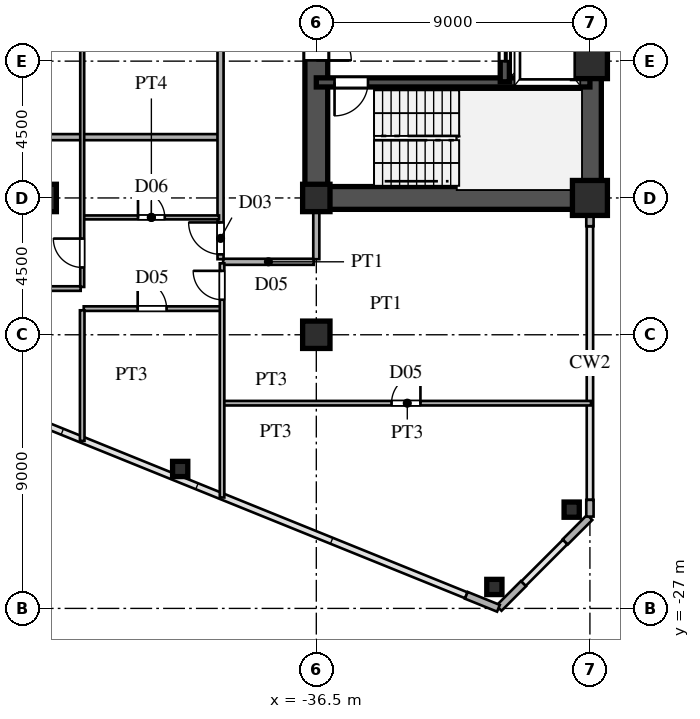
"""IFC4 building model, lengths in metres.
Left out: names, types, materials, properties, quantities, classifications, styles, units other than length and angle.
Written with IfcOpenShell. Run it as: python <this file> out.ifc"""

import sys

from ifc_helpers import new_model, si_unit, direction, frame, frame_2d, origin, origin_2d, place, context, subcontext, project, spatial, rectangle, hollow_rectangle, i_section, extrude, source, transform, mapped, element, fill, save


model = new_model("IFC4")
c1 = context("Model", 3, precision=1e-05, world=origin(), true_north=direction((0.0, 1.0)))
c2 = subcontext(c1, "Body", "Model", "MODEL_VIEW")
j1 = project(units=[si_unit("LENGTHUNIT", "METRE"), si_unit("PLANEANGLEUNIT", "RADIAN")], contexts=[c1])
p1 = place(None, origin())
s1 = spatial("IfcSite", under=j1, at=p1, CompositionType="ELEMENT")
p2 = place(p1, origin())
s2 = spatial("IfcBuilding", under=s1, at=p2, CompositionType="ELEMENT")
p3 = place(p2, frame((0.0, 0.0, 33.3)))
s3 = spatial("IfcBuildingStorey", under=s2, at=p3, CompositionType="ELEMENT", Elevation=33.3)
m1 = source(origin(), c2, "Body", "SweptSolid", [
    extrude(hollow_rectangle(XDim=1.15, YDim=1.15, WallThickness=0.048, at=origin_2d()), origin(), (0.0, 0.0, 1.0), 3.6),
])
for number, where, z_axis, x_axis in (
    (1, (-27.5, -13.5, 0.0), (0.0, 0.0, 1.0), (1.0, 0.0, 0.0)),
    (2, (-27.5, -9.0, 0.0), (0.0, 0.0, 1.0), (1.0, 0.0, 0.0)),
):
    element("IfcColumn", number, at=place(p3, frame(where, z_axis=z_axis, x_axis=x_axis)), inside=s3, PredefinedType="COLUMN", context=c2, shape_type="MappedRepresentation", body=[
        mapped(m1, transform((0.0, 0.0, 0.0), scale=1.0)),
    ])
m2 = source(origin(), c2, "Body", "SweptSolid", [
    extrude(i_section(OverallWidth=0.9, OverallDepth=0.9, WebThickness=0.036, FlangeThickness=0.055, at=origin_2d()), origin(), (0.0, 0.0, 1.0), 3.6),
])
for number, where, z_axis, x_axis in (
    (3, (-36.5, -18.0, 0.0), (0.0, 0.0, 1.0), (1.0, 0.0, 0.0)),
    (4, (-36.5, -13.5, 0.0), (0.0, 0.0, 1.0), (1.0, 0.0, 0.0)),
    (5, (-45.5, -13.5, 0.0), (0.0, 0.0, 1.0), (1.0, 0.0, 0.0)),
):
    element("IfcColumn", number, at=place(p3, frame(where, z_axis=z_axis, x_axis=x_axis)), inside=s3, PredefinedType="COLUMN", context=c2, shape_type="MappedRepresentation", body=[
        mapped(m2, transform((0.0, 0.0, 0.0), scale=1.0)),
    ])
m3 = source(origin(), c2, "Body", "SweptSolid", [
    extrude(hollow_rectangle(XDim=0.5, YDim=0.5, WallThickness=0.02, at=origin_2d()), origin(), (0.0, 0.0, 1.0), 3.6),
])
for number, where, z_axis, x_axis in (
    (6, (-28.1, -23.751, 0.0), (0.0, 0.0, 1.0), (1.0, 0.0, 0.0)),
    (7, (-30.643, -26.295, 0.0), (0.0, 0.0, 1.0), (1.0, 0.0, 0.0)),
    (8, (-40.977, -22.414, 0.0), (0.0, 0.0, 1.0), (1.0, 0.0, 0.0)),
):
    element("IfcColumn", number, at=place(p3, frame(where, z_axis=z_axis, x_axis=x_axis)), inside=s3, PredefinedType="COLUMN", context=c2, shape_type="MappedRepresentation", body=[
        mapped(m3, transform((0.0, 0.0, 0.0), scale=1.0)),
    ])
p4 = place(p3, frame((-27.5, -23.98, 0.0), z_axis=(0.0, 0.0, 1.0), x_axis=(0.0, 1.0, 0.0)))
e9 = element("IfcWall", 9, at=p4, inside=s3, PredefinedType="SOLIDWALL", context=c2, shape_type="SweptSolid", body=[
    extrude(rectangle(XDim=0.55, YDim=0.24, at=frame_2d((0.275, 0.0))), origin(), (0.0, 0.0, 1.0), 3.38),
])
p5 = place(p3, frame((-27.5, -14.43, 0.0), z_axis=(0.0, 0.0, 1.0), x_axis=(0.0, 1.0, 0.0)))
e10 = element("IfcWall", 10, at=p5, inside=s3, PredefinedType="SOLIDWALL", context=c2, shape_type="SweptSolid", body=[
    extrude(rectangle(XDim=0.55, YDim=0.24, at=frame_2d((0.275, 0.0))), origin(), (0.0, 0.0, 1.0), 2.88),
])
p6 = place(p3, frame((-31.566, -26.569, 0.0), z_axis=(0.0, 0.0, 1.0), x_axis=(0.927007103665, -0.375043770452, 0.0)))
e11 = element("IfcWall", 11, at=p6, inside=s3, PredefinedType="SOLIDWALL", context=c2, shape_type="SweptSolid", body=[
    extrude(rectangle(XDim=1.14, YDim=0.24, at=frame_2d((0.57, 0.0))), origin(), (0.0, 0.0, 1.0), 3.38),
])
for number, where, z_axis, x_axis in (
    (12, (-30.493, -26.993, 0.0), (0.0, 0.0, 1.0), (0.707, 0.707, 0.0)),
    (13, (-28.313, -24.813, 0.0), (0.0, 0.0, 1.0), (0.707, 0.707, 0.0)),
):
    element("IfcWall", number, at=place(p3, frame(where, z_axis=z_axis, x_axis=x_axis)), inside=s3, PredefinedType="SOLIDWALL", context=c2, shape_type="SweptSolid", body=[
        extrude(rectangle(XDim=1.14, YDim=0.24, at=frame_2d((0.57, 0.0))), origin(), (0.0, 0.0, 1.0), 3.38),
    ])
p7 = place(p3, frame((-27.5, -13.5, 0.0), z_axis=(0.0, 0.0, 1.0), x_axis=(0.0, 1.0, 0.0)))
e14 = element("IfcWall", 14, at=p7, inside=s3, PredefinedType="SHEAR", context=c2, shape_type="SweptSolid", body=[
    extrude(rectangle(XDim=12.2, YDim=0.75, at=frame_2d((6.1, 0.0))), origin(), (0.0, 0.0, 1.0), 3.38),
])
p8 = place(p3, frame((-36.5, -13.5, 0.0), z_axis=(0.0, 0.0, 1.0), x_axis=(1.0, 0.0, 0.0)))
e15 = element("IfcWall", 15, at=p8, inside=s3, PredefinedType="SHEAR", context=c2, shape_type="SweptSolid", body=[
    extrude(rectangle(XDim=9.0, YDim=0.75, at=frame_2d((4.5, 0.0))), origin(), (0.0, 0.0, 1.0), 3.38),
])
p9 = place(p3, frame((-36.5, -13.65, 0.0), z_axis=(0.0, 0.0, 1.0), x_axis=(0.0, 1.0, 0.0)))
e16 = element("IfcWall", 16, at=p9, inside=s3, PredefinedType="SHEAR", context=c2, shape_type="SweptSolid", body=[
    extrude(rectangle(XDim=7.15, YDim=0.75, at=frame_2d((3.575, 0.0))), origin(), (0.0, 0.0, 1.0), 3.38),
])
p10 = place(p9, frame((4.675, 0.0, 0.0)))
e17 = element("IfcOpeningElement", 17, at=p10, cuts=e16, PredefinedType="OPENING", context=c2, shape_type="SweptSolid", body=[
    extrude(rectangle(XDim=1.15, YDim=2.2, at=frame_2d((0.575, 1.1))), frame((0.0, 0.385, 0.0), z_axis=(0.0, -1.0, 0.0), x_axis=(1.0, 0.0, 0.0)), (0.0, 0.0, 1.0), 0.77),
])
p11 = place(p3, frame((-36.5, -9.7, 0.0), z_axis=(0.0, 0.0, 1.0), x_axis=(1.0, 0.0, 0.0)))
e18 = element("IfcWall", 18, at=p11, inside=s3, PredefinedType="SHEAR", context=c2, shape_type="SweptSolid", body=[
    extrude(rectangle(XDim=9.0, YDim=0.3, at=frame_2d((4.5, 0.0))), origin(), (0.0, 0.0, 1.0), 3.38),
])
p12 = place(p11, frame((0.6, 0.0, 0.0)))
e19 = element("IfcOpeningElement", 19, at=p12, cuts=e18, PredefinedType="OPENING", context=c2, shape_type="SweptSolid", body=[
    extrude(rectangle(XDim=1.1, YDim=2.2, at=frame_2d((0.55, 1.1))), frame((0.0, 0.16, 0.0), z_axis=(0.0, -1.0, 0.0), x_axis=(1.0, 0.0, 0.0)), (0.0, 0.0, 1.0), 0.32),
])
p13 = place(p3, frame((-30.3, -9.68, 0.0), z_axis=(0.0, 0.0, 1.0), x_axis=(0.0, 1.0, 0.0)))
e20 = element("IfcWall", 20, at=p13, inside=s3, PredefinedType="SHEAR", context=c2, shape_type="SweptSolid", body=[
    extrude(rectangle(XDim=2.56, YDim=0.3, at=frame_2d((1.28, 0.0))), origin(), (0.0, 0.0, 1.0), 3.38),
])
p14 = place(p13, frame((0.68, 0.0, 0.0)))
e21 = element("IfcOpeningElement", 21, at=p14, cuts=e20, PredefinedType="OPENING", context=c2, shape_type="SweptSolid", body=[
    extrude(rectangle(XDim=1.2, YDim=2.25, at=frame_2d((0.6, 1.125))), frame((0.0, 0.16, 0.0), z_axis=(0.0, -1.0, 0.0), x_axis=(1.0, 0.0, 0.0)), (0.0, 0.0, 1.0), 0.32),
])
p15 = place(p3, frame((-39.55, -20.25, 0.0), z_axis=(0.0, 0.0, 1.0), x_axis=(1.0, 0.0, 0.0)))
e22 = element("IfcWall", 22, at=p15, inside=s3, PredefinedType="PARTITIONING", context=c2, shape_type="SweptSolid", body=[
    extrude(rectangle(XDim=12.085, YDim=0.15, at=frame_2d((6.042, 0.0))), origin(), (0.0, 0.0, 1.0), 3.38),
])
p16 = place(p15, frame((5.525, 0.0, 0.0)))
e23 = element("IfcOpeningElement", 23, at=p16, cuts=e22, PredefinedType="OPENING", context=c2, shape_type="SweptSolid", body=[
    extrude(rectangle(XDim=0.95, YDim=2.15, at=frame_2d((0.475, 1.075))), frame((0.0, 0.085, 0.0), z_axis=(0.0, -1.0, 0.0), x_axis=(1.0, 0.0, 0.0)), (0.0, 0.0, 1.0), 0.17),
])
p17 = place(p3, frame((-44.15, -17.14, 0.0), z_axis=(0.0, 0.0, 1.0), x_axis=(1.0, 0.0, 0.0)))
e24 = element("IfcWall", 24, at=p17, inside=s3, PredefinedType="PARTITIONING", context=c2, shape_type="SweptSolid", body=[
    extrude(rectangle(XDim=4.5, YDim=0.15, at=frame_2d((2.25, 0.0))), origin(), (0.0, 0.0, 1.0), 3.38),
])
p18 = place(p17, frame((1.775, 0.0, 0.0)))
e25 = element("IfcOpeningElement", 25, at=p18, cuts=e24, PredefinedType="OPENING", context=c2, shape_type="SweptSolid", body=[
    extrude(rectangle(XDim=0.95, YDim=2.15, at=frame_2d((0.475, 1.075))), frame((0.0, 0.085, 0.0), z_axis=(0.0, -1.0, 0.0), x_axis=(1.0, 0.0, 0.0)), (0.0, 0.0, 1.0), 0.17),
])
p19 = place(p3, frame((-54.45, -16.48, 0.0), z_axis=(0.0, 0.0, 1.0), x_axis=(1.0, 0.0, 0.0)))
e26 = element("IfcWall", 26, at=p19, inside=s3, PredefinedType="PARTITIONING", context=c2, shape_type="SweptSolid", body=[
    extrude(rectangle(XDim=10.2, YDim=0.15, at=frame_2d((5.1, 0.0))), origin(), (0.0, 0.0, 1.0), 3.38),
])
p20 = place(p19, frame((4.625, 0.0, 0.0)))
e27 = element("IfcOpeningElement", 27, at=p20, cuts=e26, PredefinedType="OPENING", context=c2, shape_type="SweptSolid", body=[
    extrude(rectangle(XDim=0.95, YDim=2.15, at=frame_2d((0.475, 1.075))), frame((0.0, 0.085, 0.0), z_axis=(0.0, -1.0, 0.0), x_axis=(1.0, 0.0, 0.0)), (0.0, 0.0, 1.0), 0.17),
])
p21 = place(p3, frame((-39.565, -15.6, 0.0), z_axis=(0.0, 0.0, 1.0), x_axis=(1.0, 0.0, 0.0)))
e28 = element("IfcWall", 28, at=p21, inside=s3, PredefinedType="PARTITIONING", context=c2, shape_type="SweptSolid", body=[
    extrude(rectangle(XDim=2.98, YDim=0.2, at=frame_2d((1.49, 0.0))), origin(), (0.0, 0.0, 1.0), 3.38),
])
p22 = place(p3, frame((-44.15, -14.14, 0.0), z_axis=(0.0, 0.0, 1.0), x_axis=(1.0, 0.0, 0.0)))
e29 = element("IfcWall", 29, at=p22, inside=s3, PredefinedType="PARTITIONING", context=c2, shape_type="SweptSolid", body=[
    extrude(rectangle(XDim=4.45, YDim=0.13, at=frame_2d((2.225, 0.0))), origin(), (0.0, 0.0, 1.0), 3.38),
])
p23 = place(p22, frame((1.785, 0.0, 0.0)))
e30 = element("IfcOpeningElement", 30, at=p23, cuts=e29, PredefinedType="OPENING", context=c2, shape_type="SweptSolid", body=[
    extrude(rectangle(XDim=0.88, YDim=2.1, at=frame_2d((0.44, 1.05))), frame((0.0, 0.075, 0.0), z_axis=(0.0, -1.0, 0.0), x_axis=(1.0, 0.0, 0.0)), (0.0, 0.0, 1.0), 0.15),
])
p24 = place(p3, frame((-68.807, -11.5, 0.0), z_axis=(0.0, 0.0, 1.0), x_axis=(1.0, 0.0, 0.0)))
e31 = element("IfcWall", 31, at=p24, inside=s3, PredefinedType="PARTITIONING", context=c2, shape_type="SweptSolid", body=[
    extrude(rectangle(XDim=29.077, YDim=0.2, at=frame_2d((14.539, 0.0))), origin(), (0.0, 0.0, 1.0), 3.38),
])
p25 = place(p3, frame((-44.2, -21.49, 0.0), z_axis=(0.0, 0.0, 1.0), x_axis=(0.0, 1.0, 0.0)))
e32 = element("IfcWall", 32, at=p25, inside=s3, PredefinedType="PARTITIONING", context=c2, shape_type="SweptSolid", body=[
    extrude(rectangle(XDim=4.295, YDim=0.15, at=frame_2d((2.147, 0.0))), origin(), (0.0, 0.0, 1.0), 3.38),
])
p26 = place(p3, frame((-44.2, -16.427, 0.0), z_axis=(0.0, 0.0, 1.0), x_axis=(0.0, 1.0, 0.0)))
e33 = element("IfcWall", 33, at=p26, inside=s3, PredefinedType="PARTITIONING", context=c2, shape_type="SweptSolid", body=[
    extrude(rectangle(XDim=13.877, YDim=0.13, at=frame_2d((6.938, 0.0))), origin(), (0.0, 0.0, 1.0), 3.38),
])
p27 = place(p26, frame((0.641, 0.0, 0.0)))
e34 = element("IfcOpeningElement", 34, at=p27, cuts=e33, PredefinedType="OPENING", context=c2, shape_type="SweptSolid", body=[
    extrude(rectangle(XDim=0.95, YDim=2.15, at=frame_2d((0.475, 1.075))), frame((0.0, 0.075, 0.0), z_axis=(0.0, -1.0, 0.0), x_axis=(1.0, 0.0, 0.0)), (0.0, 0.0, 1.0), 0.15),
])
p28 = place(p26, frame((10.454, 0.0, 0.0)))
e35 = element("IfcOpeningElement", 35, at=p28, cuts=e33, PredefinedType="OPENING", context=c2, shape_type="SweptSolid", body=[
    extrude(rectangle(XDim=0.95, YDim=2.15, at=frame_2d((0.475, 1.075))), frame((0.0, 0.075, 0.0), z_axis=(0.0, -1.0, 0.0), x_axis=(1.0, 0.0, 0.0)), (0.0, 0.0, 1.0), 0.15),
])
p29 = place(p3, frame((-39.65, -15.515, 0.0), z_axis=(0.0, 0.0, 1.0), x_axis=(0.0, 1.0, 0.0)))
e36 = element("IfcWall", 36, at=p29, inside=s3, PredefinedType="PARTITIONING", context=c2, shape_type="SweptSolid", body=[
    extrude(rectangle(XDim=31.03, YDim=0.2, at=frame_2d((15.515, 0.0))), origin(), (0.0, 0.0, 1.0), 3.38),
])
p30 = place(p29, frame((0.16, 0.0, 0.0)))
e37 = element("IfcOpeningElement", 37, at=p30, cuts=e36, PredefinedType="OPENING", context=c2, shape_type="SweptSolid", body=[
    extrude(rectangle(XDim=1.05, YDim=2.25, at=frame_2d((0.525, 1.125))), frame((0.0, 0.11, 0.0), z_axis=(0.0, -1.0, 0.0), x_axis=(1.0, 0.0, 0.0)), (0.0, 0.0, 1.0), 0.22),
])
p31 = place(p29, frame((10.038, 0.0, 0.0)))
e38 = element("IfcOpeningElement", 38, at=p31, cuts=e36, PredefinedType="OPENING", context=c2, shape_type="SweptSolid", body=[
    extrude(rectangle(XDim=1.05, YDim=2.25, at=frame_2d((0.525, 1.125))), frame((0.0, 0.11, 0.0), z_axis=(0.0, -1.0, 0.0), x_axis=(1.0, 0.0, 0.0)), (0.0, 0.0, 1.0), 0.22),
])
p32 = place(p29, frame((21.638, 0.0, 0.0)))
e39 = element("IfcOpeningElement", 39, at=p32, cuts=e36, PredefinedType="OPENING", context=c2, shape_type="SweptSolid", body=[
    extrude(rectangle(XDim=1.05, YDim=2.25, at=frame_2d((0.525, 1.125))), frame((0.0, 0.11, 0.0), z_axis=(0.0, -1.0, 0.0), x_axis=(1.0, 0.0, 0.0)), (0.0, 0.0, 1.0), 0.22),
])
p33 = place(p29, frame((29.82, 0.0, 0.0)))
e40 = element("IfcOpeningElement", 40, at=p33, cuts=e36, PredefinedType="OPENING", context=c2, shape_type="SweptSolid", body=[
    extrude(rectangle(XDim=1.05, YDim=2.25, at=frame_2d((0.525, 1.125))), frame((0.0, 0.11, 0.0), z_axis=(0.0, -1.0, 0.0), x_axis=(1.0, 0.0, 0.0)), (0.0, 0.0, 1.0), 0.22),
])
p34 = place(p3, frame((-39.6, -23.352, 0.0), z_axis=(0.0, 0.0, 1.0), x_axis=(0.0, 1.0, 0.0)))
e41 = element("IfcWall", 41, at=p34, inside=s3, PredefinedType="PARTITIONING", context=c2, shape_type="SweptSolid", body=[
    extrude(rectangle(XDim=7.702, YDim=0.15, at=frame_2d((3.851, 0.0))), origin(), (0.0, 0.0, 1.0), 3.38),
])
p35 = place(p34, frame((6.504, 0.0, 0.0)))
e42 = element("IfcOpeningElement", 42, at=p35, cuts=e41, PredefinedType="OPENING", context=c2, shape_type="SweptSolid", body=[
    extrude(rectangle(XDim=0.95, YDim=2.15, at=frame_2d((0.475, 1.075))), frame((0.0, 0.085, 0.0), z_axis=(0.0, -1.0, 0.0), x_axis=(1.0, 0.0, 0.0)), (0.0, 0.0, 1.0), 0.17),
])
p36 = place(p3, frame((-36.5, -15.515, 0.0), z_axis=(0.0, 0.0, 1.0), x_axis=(0.0, 1.0, 0.0)))
e43 = element("IfcWall", 43, at=p36, inside=s3, PredefinedType="PARTITIONING", context=c2, shape_type="SweptSolid", body=[
    extrude(rectangle(XDim=1.635, YDim=0.2, at=frame_2d((0.817, 0.0))), origin(), (0.0, 0.0, 1.0), 2.68),
])
m4 = source(origin(), c2, "Body", "SweptSolid", [
    extrude(rectangle(XDim=1.15, YDim=2.2, at=frame_2d((0.575, 1.1))), frame((0.0, 0.025, 0.0), z_axis=(0.0, -1.0, 0.0), x_axis=(1.0, 0.0, 0.0)), (0.0, 0.0, 1.0), 0.05),
])
p37 = place(p10, frame((1.15, 0.0, 0.0), z_axis=(0.0, 0.0, 1.0), x_axis=(-1.0, 0.0, 0.0)))
e44 = element("IfcDoor", 44, at=p37, inside=s3, OperationType="SINGLE_SWING_LEFT", PredefinedType="DOOR", context=c2, shape_type="MappedRepresentation", body=[
    mapped(m4, transform((0.0, 0.0, 0.0), scale=1.0)),
])
fill(e17, e44)
m5 = source(origin(), c2, "Body", "SweptSolid", [
    extrude(rectangle(XDim=1.1, YDim=2.2, at=frame_2d((0.55, 1.1))), frame((0.0, 0.025, 0.0), z_axis=(0.0, -1.0, 0.0), x_axis=(1.0, 0.0, 0.0)), (0.0, 0.0, 1.0), 0.05),
])
p38 = place(p12, frame((1.1, 0.0, 0.0), z_axis=(0.0, 0.0, 1.0), x_axis=(-1.0, 0.0, 0.0)))
e45 = element("IfcDoor", 45, at=p38, inside=s3, OperationType="SINGLE_SWING_LEFT", PredefinedType="DOOR", context=c2, shape_type="MappedRepresentation", body=[
    mapped(m5, transform((0.0, 0.0, 0.0), scale=1.0)),
])
fill(e19, e45)
m6 = source(origin(), c2, "Body", "SweptSolid", [
    extrude(rectangle(XDim=1.2, YDim=2.25, at=frame_2d((0.6, 1.125))), frame((0.0, 0.025, 0.0), z_axis=(0.0, -1.0, 0.0), x_axis=(1.0, 0.0, 0.0)), (0.0, 0.0, 1.0), 0.05),
])
p39 = place(p14, origin())
e46 = element("IfcDoor", 46, at=p39, inside=s3, OperationType="DOUBLE_DOOR_SLIDING", PredefinedType="DOOR", context=c2, shape_type="MappedRepresentation", body=[
    mapped(m6, transform((0.0, 0.0, 0.0), scale=1.0)),
])
fill(e21, e46)
m7 = source(origin(), c2, "Body", "SweptSolid", [
    extrude(rectangle(XDim=0.95, YDim=2.15, at=frame_2d((0.475, 1.075))), frame((0.0, 0.025, 0.0), z_axis=(0.0, -1.0, 0.0), x_axis=(1.0, 0.0, 0.0)), (0.0, 0.0, 1.0), 0.05),
])
p40 = place(p16, origin())
e47 = element("IfcDoor", 47, at=p40, inside=s3, OperationType="SINGLE_SWING_RIGHT", PredefinedType="DOOR", context=c2, shape_type="MappedRepresentation", body=[
    mapped(m7, transform((0.0, 0.0, 0.0), scale=1.0)),
])
fill(e23, e47)
p41 = place(p18, origin())
e48 = element("IfcDoor", 48, at=p41, inside=s3, OperationType="SINGLE_SWING_LEFT", PredefinedType="DOOR", context=c2, shape_type="MappedRepresentation", body=[
    mapped(m7, transform((0.0, 0.0, 0.0), scale=1.0)),
])
fill(e25, e48)
m8 = source(origin(), c2, "Body", "SweptSolid", [
    extrude(rectangle(XDim=0.88, YDim=2.1, at=frame_2d((0.44, 1.05))), frame((0.0, 0.025, 0.0), z_axis=(0.0, -1.0, 0.0), x_axis=(1.0, 0.0, 0.0)), (0.0, 0.0, 1.0), 0.05),
])
p42 = place(p23, origin())
e49 = element("IfcDoor", 49, at=p42, inside=s3, OperationType="SINGLE_SWING_LEFT", PredefinedType="DOOR", context=c2, shape_type="MappedRepresentation", body=[
    mapped(m8, transform((0.0, 0.0, 0.0), scale=1.0)),
])
fill(e30, e49)
p43 = place(p27, origin())
e50 = element("IfcDoor", 50, at=p43, inside=s3, OperationType="SINGLE_SWING_RIGHT", PredefinedType="DOOR", context=c2, shape_type="MappedRepresentation", body=[
    mapped(m7, transform((0.0, 0.0, 0.0), scale=1.0)),
])
fill(e34, e50)
m9 = source(origin(), c2, "Body", "SweptSolid", [
    extrude(rectangle(XDim=1.05, YDim=2.25, at=frame_2d((0.525, 1.125))), frame((0.0, 0.025, 0.0), z_axis=(0.0, -1.0, 0.0), x_axis=(1.0, 0.0, 0.0)), (0.0, 0.0, 1.0), 0.05),
])
p44 = place(p30, origin())
e51 = element("IfcDoor", 51, at=p44, inside=s3, OperationType="SINGLE_SWING_RIGHT", PredefinedType="DOOR", context=c2, shape_type="MappedRepresentation", body=[
    mapped(m9, transform((0.0, 0.0, 0.0), scale=1.0)),
])
fill(e37, e51)
p45 = place(p35, origin())
e52 = element("IfcDoor", 52, at=p45, inside=s3, OperationType="SINGLE_SWING_RIGHT", PredefinedType="DOOR", context=c2, shape_type="MappedRepresentation", body=[
    mapped(m7, transform((0.0, 0.0, 0.0), scale=1.0)),
])
fill(e42, e52)
save(model, sys.argv[1])
